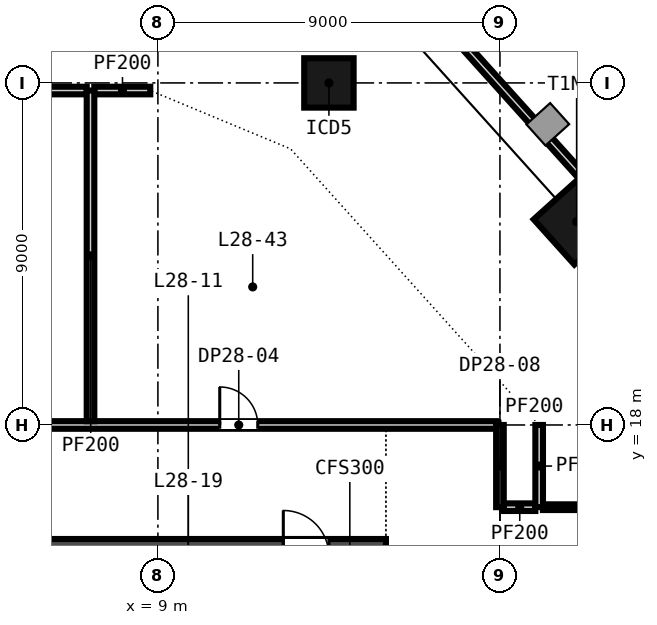
"""IFC4 building model, lengths in metres.
Left out: names, types, materials, properties, quantities, classifications, styles, units other than length and angle.
Written with IfcOpenShell. Run it as: python <this file> out.ifc"""

import sys

from ifc_helpers import new_model, si_unit, direction, frame, frame_2d, origin, origin_2d, place, context, subcontext, project, spatial, rectangle, extrude, element, fill, save


model = new_model("IFC4")
c1 = context("Model", 3, precision=1e-05, world=origin(), true_north=direction((0.0, 1.0)))
c2 = subcontext(c1, "Body", "Model", "MODEL_VIEW")
j1 = project(units=[si_unit("LENGTHUNIT", "METRE"), si_unit("PLANEANGLEUNIT", "RADIAN")], contexts=[c1])
p1 = place(None, origin())
s1 = spatial("IfcSite", under=j1, at=p1, CompositionType="ELEMENT")
p2 = place(p1, origin())
s2 = spatial("IfcBuilding", under=s1, at=p2, CompositionType="ELEMENT")
p3 = place(p2, frame((0.0, 0.0, 117.15)))
s3 = spatial("IfcBuildingStorey", under=s2, at=p3, CompositionType="ELEMENT", Elevation=117.15)
p4 = place(p3, frame((-15.0, 14.55, -0.3), z_axis=(0.0, 0.0, 1.0), x_axis=(1.0, 0.0, 0.0)))
e1 = element("IfcWall", 1, at=p4, inside=s3, PredefinedType="SOLIDWALL", context=c2, shape_type="SweptSolid", body=[
    extrude(rectangle(XDim=30.0, YDim=0.9, at=frame_2d((15.0, 0.0))), origin(), (0.0, 0.0, 1.0), 4.5),
])
p5 = place(p4, frame((9.25, 0.0, 0.3)))
e2 = element("IfcOpeningElement", 2, at=p5, cuts=e1, PredefinedType="OPENING", context=c2, shape_type="SweptSolid", body=[
    extrude(rectangle(XDim=1.5, YDim=2.1, at=frame_2d((0.75, 1.05))), frame((0.0, 0.46, 0.0), z_axis=(0.0, -1.0, 0.0), x_axis=(1.0, 0.0, 0.0)), (0.0, 0.0, 1.0), 0.92),
])
p6 = place(p4, frame((19.4, 0.0, 0.3)))
e3 = element("IfcOpeningElement", 3, at=p6, cuts=e1, PredefinedType="OPENING", context=c2, shape_type="SweptSolid", body=[
    extrude(rectangle(XDim=1.5, YDim=2.1, at=frame_2d((0.75, 1.05))), frame((0.0, 0.46, 0.0), z_axis=(0.0, -1.0, 0.0), x_axis=(1.0, 0.0, 0.0)), (0.0, 0.0, 1.0), 0.92),
])
p7 = place(p4, frame((1.5, 0.0, 0.3)))
e4 = element("IfcOpeningElement", 4, at=p7, cuts=e1, PredefinedType="OPENING", context=c2, shape_type="SweptSolid", body=[
    extrude(rectangle(XDim=1.2, YDim=2.1, at=frame_2d((0.6, 1.05))), frame((0.0, 0.46, 0.0), z_axis=(0.0, -1.0, 0.0), x_axis=(1.0, 0.0, 0.0)), (0.0, 0.0, 1.0), 0.92),
])
p8 = place(p4, frame((27.3, 0.0, 0.3)))
e5 = element("IfcOpeningElement", 5, at=p8, cuts=e1, PredefinedType="OPENING", context=c2, shape_type="SweptSolid", body=[
    extrude(rectangle(XDim=1.2, YDim=2.1, at=frame_2d((0.6, 1.05))), frame((0.0, 0.46, 0.0), z_axis=(0.0, -1.0, 0.0), x_axis=(1.0, 0.0, 0.0)), (0.0, 0.0, 1.0), 0.92),
])
p9 = place(p3, frame((20.018, 23.35, -0.3), z_axis=(0.0, 0.0, 1.0), x_axis=(-0.669130606359, 0.743144825477, 0.0)))
e6 = element("IfcColumn", 6, at=p9, inside=s3, PredefinedType="COLUMN", context=c2, shape_type="SweptSolid", body=[
    extrude(rectangle(XDim=1.6, YDim=1.6, at=origin_2d()), origin(), (0.0, 0.0, 1.0), 4.5),
])
p10 = place(p3, frame((13.5, 27.0, -0.3), z_axis=(0.0, 0.0, 1.0), x_axis=(1.0, 0.0, 0.0)))
e7 = element("IfcColumn", 7, at=p10, inside=s3, PredefinedType="COLUMN", context=c2, shape_type="SweptSolid", body=[
    extrude(rectangle(XDim=1.3, YDim=1.3, at=origin_2d()), origin(), (0.0, 0.0, 1.0), 4.5),
])
p11 = place(p3, frame((18.1, 15.837, 0.0), z_axis=(0.0, 0.0, 1.0), x_axis=(1.0, 0.0, 0.0)))
e8 = element("IfcWall", 8, at=p11, inside=s3, PredefinedType="PARTITIONING", context=c2, shape_type="SweptSolid", body=[
    extrude(rectangle(XDim=0.832, YDim=0.2, at=frame_2d((0.416, 0.0))), origin(), (0.0, 0.0, 1.0), 4.2),
])
p12 = place(p3, frame((19.132, 15.837, 0.0), z_axis=(0.0, 0.0, 1.0), x_axis=(1.0, 0.0, 0.0)))
e9 = element("IfcWall", 9, at=p12, inside=s3, PredefinedType="PARTITIONING", context=c2, shape_type="SweptSolid", body=[
    extrude(rectangle(XDim=6.507, YDim=0.15, at=frame_2d((3.253, 0.0))), origin(), (0.0, 0.0, 1.0), 4.2),
])
p13 = place(p3, frame((-21.646, 18.0, 0.0), z_axis=(0.0, 0.0, 1.0), x_axis=(1.0, 0.0, 0.0)))
e10 = element("IfcWall", 10, at=p13, inside=s3, PredefinedType="PARTITIONING", context=c2, shape_type="SweptSolid", body=[
    extrude(rectangle(XDim=39.546, YDim=0.2, at=frame_2d((19.773, 0.0))), origin(), (0.0, 0.0, 1.0), 4.2),
])
p14 = place(p13, frame((8.796, 0.0, 0.0)))
e11 = element("IfcOpeningElement", 11, at=p14, cuts=e10, PredefinedType="OPENING", context=c2, shape_type="SweptSolid", body=[
    extrude(rectangle(XDim=1.0, YDim=2.1, at=frame_2d((0.5, 1.05))), frame((0.0, 0.11, 0.0), z_axis=(0.0, -1.0, 0.0), x_axis=(1.0, 0.0, 0.0)), (0.0, 0.0, 1.0), 0.22),
])
p15 = place(p13, frame((19.9, 0.0, 0.0)))
e12 = element("IfcOpeningElement", 12, at=p15, cuts=e10, PredefinedType="OPENING", context=c2, shape_type="SweptSolid", body=[
    extrude(rectangle(XDim=1.0, YDim=2.1, at=frame_2d((0.5, 1.05))), frame((0.0, 0.11, 0.0), z_axis=(0.0, -1.0, 0.0), x_axis=(1.0, 0.0, 0.0)), (0.0, 0.0, 1.0), 0.22),
])
p16 = place(p13, frame((32.273, 0.0, 0.0)))
e13 = element("IfcOpeningElement", 13, at=p16, cuts=e10, PredefinedType="OPENING", context=c2, shape_type="SweptSolid", body=[
    extrude(rectangle(XDim=1.0, YDim=2.1, at=frame_2d((0.5, 1.05))), frame((0.0, 0.11, 0.0), z_axis=(0.0, -1.0, 0.0), x_axis=(1.0, 0.0, 0.0)), (0.0, 0.0, 1.0), 0.22),
])
p17 = place(p3, frame((0.65, 26.8, 0.0), z_axis=(0.0, 0.0, 1.0), x_axis=(1.0, 0.0, 0.0)))
e14 = element("IfcWall", 14, at=p17, inside=s3, PredefinedType="PARTITIONING", context=c2, shape_type="SweptSolid", body=[
    extrude(rectangle(XDim=6.477, YDim=0.2, at=frame_2d((3.239, 0.0))), origin(), (0.0, 0.0, 1.0), 4.2),
])
p18 = place(p3, frame((7.327, 26.8, 0.0), z_axis=(0.0, 0.0, 1.0), x_axis=(1.0, 0.0, 0.0)))
e15 = element("IfcWall", 15, at=p18, inside=s3, PredefinedType="PARTITIONING", context=c2, shape_type="SweptSolid", body=[
    extrude(rectangle(XDim=1.472, YDim=0.2, at=frame_2d((0.736, 0.0))), origin(), (0.0, 0.0, 1.0), 4.2),
])
p19 = place(p3, frame((7.227, 18.1, 0.0), z_axis=(0.0, 0.0, 1.0), x_axis=(0.0, 1.0, 0.0)))
e16 = element("IfcWall", 16, at=p19, inside=s3, PredefinedType="PARTITIONING", context=c2, shape_type="SweptSolid", body=[
    extrude(rectangle(XDim=8.7, YDim=0.2, at=frame_2d((4.35, 0.0))), origin(), (0.0, 0.0, 1.0), 4.2),
])
p20 = place(p3, frame((18.0, 15.837, 0.0), z_axis=(0.0, 0.0, 1.0), x_axis=(0.0, 1.0, 0.0)))
e17 = element("IfcWall", 17, at=p20, inside=s3, PredefinedType="PARTITIONING", context=c2, shape_type="SweptSolid", body=[
    extrude(rectangle(XDim=2.163, YDim=0.2, at=frame_2d((1.081, 0.0))), origin(), (0.0, 0.0, 1.0), 4.2),
])
p21 = place(p3, frame((19.032, 15.838, 0.0), z_axis=(0.0, 0.0, 1.0), x_axis=(0.0, 1.0, 0.0)))
e18 = element("IfcWall", 18, at=p21, inside=s3, PredefinedType="PARTITIONING", context=c2, shape_type="SweptSolid", body=[
    extrude(rectangle(XDim=2.162, YDim=0.2, at=frame_2d((1.081, 0.0))), origin(), (0.0, 0.0, 1.0), 3.797),
])
p22 = place(p3, frame((14.924, 30.353, 0.0), z_axis=(0.0, 0.0, 1.0), x_axis=(0.669133646521, -0.743142088092, 0.0)))
e19 = element("IfcWall", 19, at=p22, inside=s3, PredefinedType="PARTITIONING", context=c2, shape_type="SweptSolid", body=[
    extrude(rectangle(XDim=34.413, YDim=0.2, at=frame_2d((17.207, 0.0))), origin(), (0.0, 0.0, 1.0), 4.2),
])
p23 = place(p16, origin())
e20 = element("IfcDoor", 20, at=p23, inside=s3, OperationType="SINGLE_SWING_LEFT", PredefinedType="DOOR", context=c2, shape_type="SweptSolid", body=[
    extrude(rectangle(XDim=1.0, YDim=2.1, at=frame_2d((0.5, 1.05))), frame((0.0, 0.025, 0.0), z_axis=(0.0, -1.0, 0.0), x_axis=(1.0, 0.0, 0.0)), (0.0, 0.0, 1.0), 0.05),
])
fill(e13, e20)
save(model, sys.argv[1])
